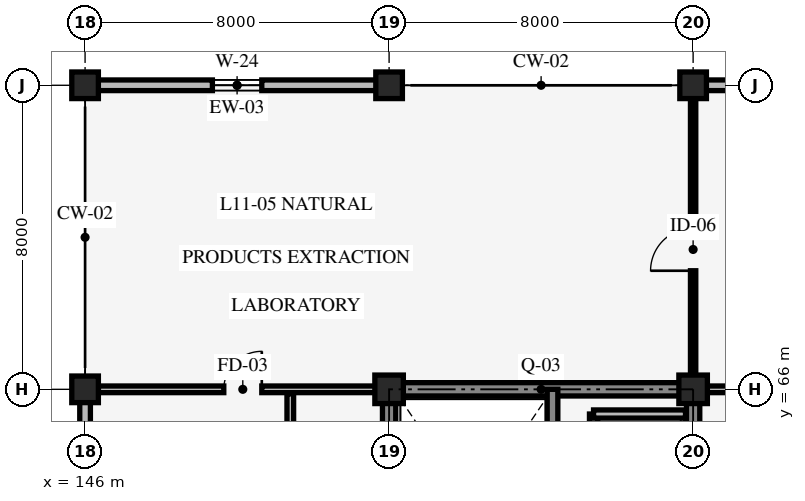
"""IFC4 building model, lengths in metres.
Left out: names, types, materials, properties, quantities, classifications, styles, units other than length and angle.
Written with IfcOpenShell. Run it as: python <this file> out.ifc"""

import sys

from ifc_helpers import new_model, si_unit, direction, frame, frame_2d, origin, origin_2d, place, context, subcontext, project, spatial, rectangle, extrude, element, fill, save


model = new_model("IFC4")
c1 = context("Model", 3, precision=1e-05, world=origin(), true_north=direction((0.0, 1.0)))
c2 = subcontext(c1, "Body", "Model", "MODEL_VIEW")
j1 = project(units=[si_unit("LENGTHUNIT", "METRE"), si_unit("PLANEANGLEUNIT", "RADIAN")], contexts=[c1])
p1 = place(None, origin())
s1 = spatial("IfcSite", under=j1, at=p1, CompositionType="ELEMENT")
p2 = place(p1, origin())
s2 = spatial("IfcBuilding", under=s1, at=p2, CompositionType="ELEMENT")
p3 = place(p2, frame((0.0, 0.0, 44.4)))
s3 = spatial("IfcBuildingStorey", under=s2, at=p3, CompositionType="ELEMENT", Elevation=44.4)
p4 = place(p3, frame((162.0, 58.0, 0.0), z_axis=(0.0, 0.0, 1.0), x_axis=(0.0, 1.0, 0.0)))
e1 = element("IfcWall", 1, at=p4, inside=s3, PredefinedType="SHEAR", context=c2, shape_type="SweptSolid", body=[
    extrude(rectangle(XDim=8.0, YDim=0.35, at=frame_2d((4.0, 0.0))), origin(), (0.0, 0.0, 1.0), 3.95),
])
p5 = place(p4, frame((3.275, 0.0, 0.0)))
e2 = element("IfcOpeningElement", 2, at=p5, cuts=e1, PredefinedType="OPENING", context=c2, shape_type="SweptSolid", body=[
    extrude(rectangle(XDim=1.05, YDim=2.2, at=frame_2d((0.525, 1.1))), frame((0.0, 0.185, 0.0), z_axis=(0.0, -1.0, 0.0), x_axis=(1.0, 0.0, 0.0)), (0.0, 0.0, 1.0), 0.37),
])
p6 = place(p4, frame((5.45, 0.0, 0.0)))
e3 = element("IfcOpeningElement", 3, at=p6, cuts=e1, PredefinedType="OPENING", context=c2, shape_type="SweptSolid", body=[
    extrude(rectangle(XDim=1.4, YDim=2.3, at=frame_2d((0.7, 1.15))), frame((0.0, 0.185, 0.0), z_axis=(0.0, -1.0, 0.0), x_axis=(1.0, 0.0, 0.0)), (0.0, 0.0, 1.0), 0.37),
])
for number, where, z_axis, x_axis in (
    (4, (162.0, 66.0, 0.0), (0.0, 0.0, 1.0), (-1.0, 0.0, 0.0)),
    (5, (154.0, 66.0, 0.0), (0.0, 0.0, 1.0), (0.0, -1.0, 0.0)),
):
    element("IfcWall", number, at=place(p3, frame(where, z_axis=z_axis, x_axis=x_axis)), inside=s3, PredefinedType="SHEAR", context=c2, shape_type="SweptSolid", body=[
        extrude(rectangle(XDim=8.0, YDim=0.35, at=frame_2d((4.0, 0.0))), origin(), (0.0, 0.0, 1.0), 3.95),
    ])
p7 = place(p3, frame((158.3, 58.0, 0.0), z_axis=(0.0, 0.0, 1.0), x_axis=(0.0, 1.0, 0.0)))
e6 = element("IfcWall", 6, at=p7, inside=s3, PredefinedType="SHEAR", context=c2, shape_type="SweptSolid", body=[
    extrude(rectangle(XDim=8.0, YDim=0.28, at=frame_2d((4.0, 0.0))), origin(), (0.0, 0.0, 1.0), 3.95),
])
for number, where, z_axis, x_axis in (
    (7, (146.0, 66.0, 0.0), (0.0, 0.0, 1.0), (1.0, 0.0, 0.0)),
    (8, (146.0, 74.0, 0.0), (0.0, 0.0, 1.0), (1.0, 0.0, 0.0)),
):
    element("IfcColumn", number, at=place(p3, frame(where, z_axis=z_axis, x_axis=x_axis)), inside=s3, PredefinedType="COLUMN", context=c2, shape_type="SweptSolid", body=[
        extrude(rectangle(XDim=0.7, YDim=0.7, at=origin_2d()), origin(), (0.0, 0.0, 1.0), 4.2),
    ])
p8 = place(p3, frame((154.0, 66.0, 0.0), z_axis=(0.0, 0.0, 1.0), x_axis=(1.0, 0.0, 0.0)))
e9 = element("IfcColumn", 9, at=p8, inside=s3, PredefinedType="COLUMN", context=c2, shape_type="SweptSolid", body=[
    extrude(rectangle(XDim=0.75, YDim=0.75, at=origin_2d()), origin(), (0.0, 0.0, 1.0), 4.2),
])
p9 = place(p3, frame((154.0, 74.0, 0.0), z_axis=(0.0, 0.0, 1.0), x_axis=(1.0, 0.0, 0.0)))
e10 = element("IfcColumn", 10, at=p9, inside=s3, PredefinedType="COLUMN", context=c2, shape_type="SweptSolid", body=[
    extrude(rectangle(XDim=0.7, YDim=0.7, at=origin_2d()), origin(), (0.0, 0.0, 1.0), 4.2),
])
p10 = place(p3, frame((162.0, 66.0, 0.0), z_axis=(0.0, 0.0, 1.0), x_axis=(1.0, 0.0, 0.0)))
e11 = element("IfcColumn", 11, at=p10, inside=s3, PredefinedType="COLUMN", context=c2, shape_type="SweptSolid", body=[
    extrude(rectangle(XDim=0.75, YDim=0.75, at=origin_2d()), origin(), (0.0, 0.0, 1.0), 4.2),
])
p11 = place(p3, frame((162.0, 74.0, 0.0), z_axis=(0.0, 0.0, 1.0), x_axis=(1.0, 0.0, 0.0)))
e12 = element("IfcColumn", 12, at=p11, inside=s3, PredefinedType="COLUMN", context=c2, shape_type="SweptSolid", body=[
    extrude(rectangle(XDim=0.7, YDim=0.7, at=origin_2d()), origin(), (0.0, 0.0, 1.0), 4.2),
])
p12 = place(p3, frame((146.0, 58.0, 0.0), z_axis=(0.0, 0.0, 1.0), x_axis=(0.0, 1.0, 0.0)))
e13 = element("IfcWall", 13, at=p12, inside=s3, PredefinedType="STANDARD", context=c2, shape_type="SweptSolid", body=[
    extrude(rectangle(XDim=8.0, YDim=0.28, at=frame_2d((4.0, 0.0))), origin(), (0.0, 0.0, 1.0), 3.24),
])
p13 = place(p12, frame((3.15, 0.0, 0.85)))
e14 = element("IfcOpeningElement", 14, at=p13, cuts=e13, PredefinedType="OPENING", context=c2, shape_type="SweptSolid", body=[
    extrude(rectangle(XDim=1.7, YDim=1.2, at=frame_2d((0.85, 0.6))), frame((0.0, 0.15, 0.0), z_axis=(0.0, -1.0, 0.0), x_axis=(1.0, 0.0, 0.0)), (0.0, 0.0, 1.0), 0.3),
])
p14 = place(p3, frame((146.0, 74.0, 0.0), z_axis=(0.0, 0.0, 1.0), x_axis=(1.0, 0.0, 0.0)))
e15 = element("IfcWall", 15, at=p14, inside=s3, PredefinedType="STANDARD", context=c2, shape_type="SweptSolid", body=[
    extrude(rectangle(XDim=8.0, YDim=0.28, at=frame_2d((4.0, 0.0))), origin(), (0.0, 0.0, 1.0), 3.4),
])
p15 = place(p14, frame((3.35, 0.0, 0.85)))
e16 = element("IfcOpeningElement", 16, at=p15, cuts=e15, PredefinedType="OPENING", context=c2, shape_type="SweptSolid", body=[
    extrude(rectangle(XDim=1.3, YDim=1.7, at=frame_2d((0.65, 0.85))), frame((0.0, 0.15, 0.0), z_axis=(0.0, -1.0, 0.0), x_axis=(1.0, 0.0, 0.0)), (0.0, 0.0, 1.0), 0.3),
])
p16 = place(p3, frame((162.0, 74.0, 0.0), z_axis=(0.0, 0.0, 1.0), x_axis=(1.0, 0.0, 0.0)))
e17 = element("IfcWall", 17, at=p16, inside=s3, PredefinedType="STANDARD", context=c2, shape_type="SweptSolid", body=[
    extrude(rectangle(XDim=8.0, YDim=0.28, at=frame_2d((4.0, 0.0))), origin(), (0.0, 0.0, 1.0), 3.4),
])
p17 = place(p16, frame((2.8, 0.0, 0.85)))
e18 = element("IfcOpeningElement", 18, at=p17, cuts=e17, PredefinedType="OPENING", context=c2, shape_type="SweptSolid", body=[
    extrude(rectangle(XDim=2.4, YDim=1.8, at=frame_2d((1.2, 0.9))), frame((0.0, 0.15, 0.0), z_axis=(0.0, -1.0, 0.0), x_axis=(1.0, 0.0, 0.0)), (0.0, 0.0, 1.0), 0.3),
])
p18 = place(p3, frame((159.38, 62.9, 0.0), z_axis=(0.0, 0.0, 1.0), x_axis=(0.0, 1.0, 0.0)))
e19 = element("IfcWall", 19, at=p18, inside=s3, PredefinedType="STANDARD", context=c2, shape_type="SweptSolid", body=[
    extrude(rectangle(XDim=2.45, YDim=0.215, at=frame_2d((1.225, 0.0))), origin(), (0.0, 0.0, 1.0), 3.9),
])
p19 = place(p3, frame((159.38, 65.35, 0.0), z_axis=(0.0, 0.0, 1.0), x_axis=(1.0, 0.0, 0.0)))
e20 = element("IfcWall", 20, at=p19, inside=s3, PredefinedType="STANDARD", context=c2, shape_type="SweptSolid", body=[
    extrude(rectangle(XDim=2.42, YDim=0.215, at=frame_2d((1.21, 0.0))), origin(), (0.0, 0.0, 1.0), 3.9),
])
p20 = place(p3, frame((151.4, 58.12, 0.0), z_axis=(0.0, 0.0, 1.0), x_axis=(0.0, 1.0, 0.0)))
e21 = element("IfcWall", 21, at=p20, inside=s3, PredefinedType="STANDARD", context=c2, shape_type="SweptSolid", body=[
    extrude(rectangle(XDim=7.76, YDim=0.175, at=frame_2d((3.88, 0.0))), origin(), (0.0, 0.0, 1.0), 3.9),
])
p21 = place(p20, frame((3.105, 0.0, 0.0)))
e22 = element("IfcOpeningElement", 22, at=p21, cuts=e21, PredefinedType="OPENING", context=c2, shape_type="SweptSolid", body=[
    extrude(rectangle(XDim=1.55, YDim=2.25, at=frame_2d((0.775, 1.125))), frame((0.0, 0.098, 0.0), z_axis=(0.0, -1.0, 0.0), x_axis=(1.0, 0.0, 0.0)), (0.0, 0.0, 1.0), 0.195),
])
p22 = place(p3, frame((146.35, 66.0, 0.0), z_axis=(0.0, 0.0, 1.0), x_axis=(1.0, 0.0, 0.0)))
e23 = element("IfcWall", 23, at=p22, inside=s3, PredefinedType="STANDARD", context=c2, shape_type="SweptSolid", body=[
    extrude(rectangle(XDim=7.3, YDim=0.175, at=frame_2d((3.65, 0.0))), origin(), (0.0, 0.0, 1.0), 3.19),
])
p23 = place(p22, frame((3.3, 0.0, 0.0)))
e24 = element("IfcOpeningElement", 24, at=p23, cuts=e23, PredefinedType="OPENING", context=c2, shape_type="SweptSolid", body=[
    extrude(rectangle(XDim=1.0, YDim=2.1, at=frame_2d((0.5, 1.05))), frame((0.0, 0.098, 0.0), z_axis=(0.0, -1.0, 0.0), x_axis=(1.0, 0.0, 0.0)), (0.0, 0.0, 1.0), 0.195),
])
p24 = place(p3, frame((162.0, 66.12, 0.0), z_axis=(0.0, 0.0, 1.0), x_axis=(0.0, 1.0, 0.0)))
e25 = element("IfcWall", 25, at=p24, inside=s3, PredefinedType="STANDARD", context=c2, shape_type="SweptSolid", body=[
    extrude(rectangle(XDim=7.83, YDim=0.14, at=frame_2d((3.915, 0.0))), origin(), (0.0, 0.0, 1.0), 3.9),
])
p25 = place(p24, frame((3.0, 0.0, 0.0)))
e26 = element("IfcOpeningElement", 26, at=p25, cuts=e25, PredefinedType="OPENING", context=c2, shape_type="SweptSolid", body=[
    extrude(rectangle(XDim=1.12, YDim=2.12, at=frame_2d((0.56, 1.06))), frame((0.0, 0.08, 0.0), z_axis=(0.0, -1.0, 0.0), x_axis=(1.0, 0.0, 0.0)), (0.0, 0.0, 1.0), 0.16),
])
p26 = place(p3, frame((162.35, 66.0, 0.0), z_axis=(0.0, 0.0, 1.0), x_axis=(1.0, 0.0, 0.0)))
e27 = element("IfcWall", 27, at=p26, inside=s3, PredefinedType="STANDARD", context=c2, shape_type="SweptSolid", body=[
    extrude(rectangle(XDim=14.7, YDim=0.175, at=frame_2d((7.35, 0.0))), origin(), (0.0, 0.0, 1.0), 3.19),
])
p27 = place(p26, frame((1.05, 0.0, 0.0)))
e28 = element("IfcOpeningElement", 28, at=p27, cuts=e27, PredefinedType="OPENING", context=c2, shape_type="SweptSolid", body=[
    extrude(rectangle(XDim=0.9, YDim=2.1, at=frame_2d((0.45, 1.05))), frame((0.0, 0.098, 0.0), z_axis=(0.0, -1.0, 0.0), x_axis=(1.0, 0.0, 0.0)), (0.0, 0.0, 1.0), 0.195),
])
p28 = place(p15, origin())
e29 = element("IfcWindow", 29, at=p28, inside=s3, PartitioningType="SINGLE_PANEL", PredefinedType="WINDOW", context=c2, shape_type="SweptSolid", body=[
    extrude(rectangle(XDim=1.3, YDim=1.7, at=frame_2d((0.65, 0.85))), frame((0.0, 0.03, 0.0), z_axis=(0.0, -1.0, 0.0), x_axis=(1.0, 0.0, 0.0)), (0.0, 0.0, 1.0), 0.06),
])
fill(e16, e29)
p29 = place(p23, origin())
e30 = element("IfcDoor", 30, at=p29, inside=s3, OperationType="SINGLE_SWING_RIGHT", PredefinedType="DOOR", context=c2, shape_type="SweptSolid", body=[
    extrude(rectangle(XDim=1.0, YDim=2.1, at=frame_2d((0.5, 1.05))), frame((0.0, 0.025, 0.0), z_axis=(0.0, -1.0, 0.0), x_axis=(1.0, 0.0, 0.0)), (0.0, 0.0, 1.0), 0.05),
])
fill(e24, e30)
p30 = place(p25, origin())
e31 = element("IfcDoor", 31, at=p30, inside=s3, OperationType="SINGLE_SWING_LEFT", PredefinedType="DOOR", context=c2, shape_type="SweptSolid", body=[
    extrude(rectangle(XDim=1.12, YDim=2.12, at=frame_2d((0.56, 1.06))), frame((0.0, 0.025, 0.0), z_axis=(0.0, -1.0, 0.0), x_axis=(1.0, 0.0, 0.0)), (0.0, 0.0, 1.0), 0.05),
])
fill(e26, e31)
save(model, sys.argv[1])
